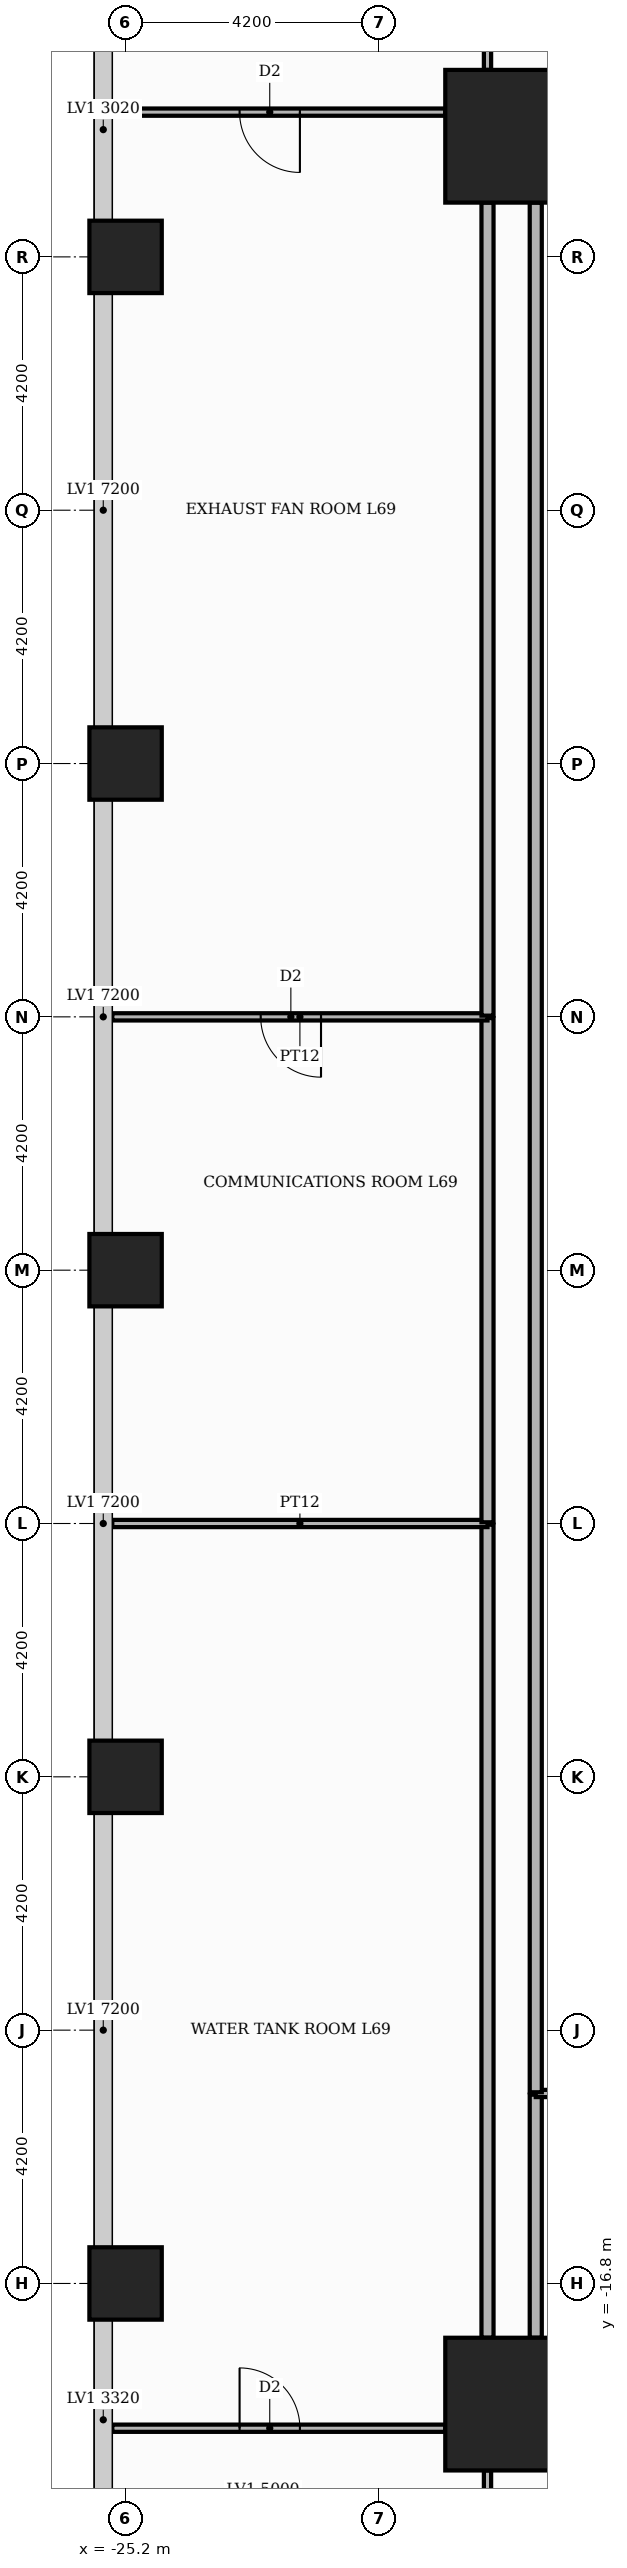
"""IFC4 building model, lengths in metres.
Left out: names, types, materials, properties, quantities, classifications, styles, units other than length and angle.
Written with IfcOpenShell. Run it as: python <this file> out.ifc"""

import sys

from ifc_helpers import new_model, si_unit, direction, frame, frame_2d, origin, origin_2d, place, context, subcontext, project, spatial, rectangle, extrude, element, fill, save


model = new_model("IFC4")
c1 = context("Model", 3, precision=1e-05, world=origin(), true_north=direction((0.0, 1.0)))
c2 = subcontext(c1, "Body", "Model", "MODEL_VIEW")
j1 = project(units=[si_unit("LENGTHUNIT", "METRE"), si_unit("PLANEANGLEUNIT", "RADIAN")], contexts=[c1])
p1 = place(None, origin())
s1 = spatial("IfcSite", under=j1, at=p1, CompositionType="ELEMENT")
p2 = place(p1, origin())
s2 = spatial("IfcBuilding", under=s1, at=p2, CompositionType="ELEMENT")
p3 = place(p2, frame((0.0, 0.0, 287.4)))
s3 = spatial("IfcBuildingStorey", under=s2, at=p3, CompositionType="ELEMENT", Elevation=287.4)
for number, where, z_axis, x_axis in (
    (1, (-18.8, 18.8, 0.0), (0.0, 0.0, 1.0), (1.0, 0.0, 0.0)),
    (2, (-18.8, -18.8, 0.0), (0.0, 0.0, 1.0), (1.0, 0.0, 0.0)),
):
    element("IfcColumn", number, at=place(p3, frame(where, z_axis=z_axis, x_axis=x_axis)), inside=s3, PredefinedType="COLUMN", context=c2, shape_type="SweptSolid", body=[
        extrude(rectangle(XDim=2.2, YDim=2.2, at=origin_2d()), origin(), (0.0, 0.0, 1.0), 5.4),
    ])
for number, where, z_axis, x_axis in (
    (3, (-25.2, 0.0, 0.0), (0.0, 0.0, 1.0), (1.0, 0.0, 0.0)),
    (4, (-25.2, -8.4, 0.0), (0.0, 0.0, 1.0), (1.0, 0.0, 0.0)),
    (5, (-25.2, -16.8, 0.0), (0.0, 0.0, 1.0), (1.0, 0.0, 0.0)),
    (6, (-25.2, 8.4, 0.0), (0.0, 0.0, 1.0), (1.0, 0.0, 0.0)),
    (7, (-25.2, 16.8, 0.0), (0.0, 0.0, 1.0), (1.0, 0.0, 0.0)),
):
    element("IfcColumn", number, at=place(p3, frame(where, z_axis=z_axis, x_axis=x_axis)), inside=s3, PredefinedType="COLUMN", context=c2, shape_type="SweptSolid", body=[
        extrude(rectangle(XDim=1.2, YDim=1.2, at=origin_2d()), origin(), (0.0, 0.0, 1.0), 5.4),
    ])
p4 = place(p3, frame((-19.2, -25.42, 0.0), z_axis=(0.0, 0.0, 1.0), x_axis=(0.0, 1.0, 0.0)))
e8 = element("IfcWall", 8, at=p4, inside=s3, PredefinedType="PARTITIONING", context=c2, shape_type="SweptSolid", body=[
    extrude(rectangle(XDim=5.52, YDim=0.12, at=frame_2d((2.76, 0.0))), origin(), (0.0, 0.0, 1.0), 5.05),
])
p5 = place(p4, frame((2.11, 0.0, 0.0)))
e9 = element("IfcOpeningElement", 9, at=p5, cuts=e8, PredefinedType="OPENING", context=c2, shape_type="SweptSolid", body=[
    extrude(rectangle(XDim=1.0, YDim=2.1, at=frame_2d((0.5, 1.05))), frame((0.0, 0.07, 0.0), z_axis=(0.0, -1.0, 0.0), x_axis=(1.0, 0.0, 0.0)), (0.0, 0.0, 1.0), 0.14),
])
p6 = place(p3, frame((-25.42, -19.2, 0.0), z_axis=(0.0, 0.0, 1.0), x_axis=(1.0, 0.0, 0.0)))
e10 = element("IfcWall", 10, at=p6, inside=s3, PredefinedType="PARTITIONING", context=c2, shape_type="SweptSolid", body=[
    extrude(rectangle(XDim=5.52, YDim=0.12, at=frame_2d((2.76, 0.0))), origin(), (0.0, 0.0, 1.0), 5.05),
])
p7 = place(p6, frame((2.11, 0.0, 0.0)))
e11 = element("IfcOpeningElement", 11, at=p7, cuts=e10, PredefinedType="OPENING", context=c2, shape_type="SweptSolid", body=[
    extrude(rectangle(XDim=1.0, YDim=2.1, at=frame_2d((0.5, 1.05))), frame((0.0, 0.07, 0.0), z_axis=(0.0, -1.0, 0.0), x_axis=(1.0, 0.0, 0.0)), (0.0, 0.0, 1.0), 0.14),
])
p8 = place(p3, frame((-19.2, -17.7, 0.0), z_axis=(0.0, 0.0, 1.0), x_axis=(0.0, 1.0, 0.0)))
e12 = element("IfcWall", 12, at=p8, inside=s3, PredefinedType="PARTITIONING", context=c2, shape_type="SweptSolid", body=[
    extrude(rectangle(XDim=13.48, YDim=0.2, at=frame_2d((6.74, 0.0))), origin(), (0.0, 0.0, 1.0), 5.05),
])
p9 = place(p3, frame((-18.4, -17.7, 0.0), z_axis=(0.0, 0.0, 1.0), x_axis=(0.0, 1.0, 0.0)))
e13 = element("IfcWall", 13, at=p9, inside=s3, PredefinedType="PARTITIONING", context=c2, shape_type="SweptSolid", body=[
    extrude(rectangle(XDim=4.03, YDim=0.2, at=frame_2d((2.015, 0.0))), origin(), (0.0, 0.0, 1.0), 5.05),
])
p10 = place(p3, frame((-18.4, -13.65, 0.0), z_axis=(0.0, 0.0, 1.0), x_axis=(1.0, 0.0, 0.0)))
e14 = element("IfcWall", 14, at=p10, inside=s3, PredefinedType="PARTITIONING", context=c2, shape_type="SweptSolid", body=[
    extrude(rectangle(XDim=4.75, YDim=0.12, at=frame_2d((2.375, 0.0))), origin(), (0.0, 0.0, 1.0), 5.05),
])
p11 = place(p3, frame((-18.4, -13.63, 0.0), z_axis=(0.0, 0.0, 1.0), x_axis=(0.0, 1.0, 0.0)))
e15 = element("IfcWall", 15, at=p11, inside=s3, PredefinedType="PARTITIONING", context=c2, shape_type="SweptSolid", body=[
    extrude(rectangle(XDim=31.33, YDim=0.2, at=frame_2d((15.665, 0.0))), origin(), (0.0, 0.0, 1.0), 5.05),
])
p12 = place(p3, frame((-25.42, -4.2, 0.0), z_axis=(0.0, 0.0, 1.0), x_axis=(1.0, 0.0, 0.0)))
e16 = element("IfcWall", 16, at=p12, inside=s3, PredefinedType="PARTITIONING", context=c2, shape_type="SweptSolid", body=[
    extrude(rectangle(XDim=6.22, YDim=0.12, at=frame_2d((3.11, 0.0))), origin(), (0.0, 0.0, 1.0), 5.05),
])
p13 = place(p3, frame((-19.2, -4.18, 0.0), z_axis=(0.0, 0.0, 1.0), x_axis=(0.0, 1.0, 0.0)))
e17 = element("IfcWall", 17, at=p13, inside=s3, PredefinedType="PARTITIONING", context=c2, shape_type="SweptSolid", body=[
    extrude(rectangle(XDim=8.36, YDim=0.2, at=frame_2d((4.18, 0.0))), origin(), (0.0, 0.0, 1.0), 5.05),
])
p14 = place(p3, frame((-25.42, 4.2, 0.0), z_axis=(0.0, 0.0, 1.0), x_axis=(1.0, 0.0, 0.0)))
e18 = element("IfcWall", 18, at=p14, inside=s3, PredefinedType="PARTITIONING", context=c2, shape_type="SweptSolid", body=[
    extrude(rectangle(XDim=6.22, YDim=0.12, at=frame_2d((3.11, 0.0))), origin(), (0.0, 0.0, 1.0), 5.05),
])
p15 = place(p14, frame((2.46, 0.0, 0.0)))
e19 = element("IfcOpeningElement", 19, at=p15, cuts=e18, PredefinedType="OPENING", context=c2, shape_type="SweptSolid", body=[
    extrude(rectangle(XDim=1.0, YDim=2.1, at=frame_2d((0.5, 1.05))), frame((0.0, 0.07, 0.0), z_axis=(0.0, -1.0, 0.0), x_axis=(1.0, 0.0, 0.0)), (0.0, 0.0, 1.0), 0.14),
])
p16 = place(p3, frame((-19.2, 4.22, 0.0), z_axis=(0.0, 0.0, 1.0), x_axis=(0.0, 1.0, 0.0)))
e20 = element("IfcWall", 20, at=p16, inside=s3, PredefinedType="PARTITIONING", context=c2, shape_type="SweptSolid", body=[
    extrude(rectangle(XDim=13.48, YDim=0.2, at=frame_2d((6.74, 0.0))), origin(), (0.0, 0.0, 1.0), 5.05),
])
p17 = place(p3, frame((-25.42, 19.2, 0.0), z_axis=(0.0, 0.0, 1.0), x_axis=(1.0, 0.0, 0.0)))
e21 = element("IfcWall", 21, at=p17, inside=s3, PredefinedType="PARTITIONING", context=c2, shape_type="SweptSolid", body=[
    extrude(rectangle(XDim=5.52, YDim=0.12, at=frame_2d((2.76, 0.0))), origin(), (0.0, 0.0, 1.0), 5.05),
])
p18 = place(p17, frame((2.11, 0.0, 0.0)))
e22 = element("IfcOpeningElement", 22, at=p18, cuts=e21, PredefinedType="OPENING", context=c2, shape_type="SweptSolid", body=[
    extrude(rectangle(XDim=1.0, YDim=2.1, at=frame_2d((0.5, 1.05))), frame((0.0, 0.07, 0.0), z_axis=(0.0, -1.0, 0.0), x_axis=(1.0, 0.0, 0.0)), (0.0, 0.0, 1.0), 0.14),
])
p19 = place(p3, frame((-19.2, 19.9, 0.0), z_axis=(0.0, 0.0, 1.0), x_axis=(0.0, 1.0, 0.0)))
e23 = element("IfcWall", 23, at=p19, inside=s3, PredefinedType="PARTITIONING", context=c2, shape_type="SweptSolid", body=[
    extrude(rectangle(XDim=5.52, YDim=0.12, at=frame_2d((2.76, 0.0))), origin(), (0.0, 0.0, 1.0), 5.05),
])
p20 = place(p19, frame((2.41, 0.0, 0.0)))
e24 = element("IfcOpeningElement", 24, at=p20, cuts=e23, PredefinedType="OPENING", context=c2, shape_type="SweptSolid", body=[
    extrude(rectangle(XDim=1.0, YDim=2.1, at=frame_2d((0.5, 1.05))), frame((0.0, 0.07, 0.0), z_axis=(0.0, -1.0, 0.0), x_axis=(1.0, 0.0, 0.0)), (0.0, 0.0, 1.0), 0.14),
])
p21 = place(p18, frame((1.0, 0.0, 0.0), z_axis=(0.0, 0.0, 1.0), x_axis=(-1.0, 0.0, 0.0)))
e25 = element("IfcDoor", 25, at=p21, inside=s3, OperationType="SINGLE_SWING_RIGHT", PredefinedType="DOOR", context=c2, shape_type="SweptSolid", body=[
    extrude(rectangle(XDim=1.0, YDim=2.1, at=frame_2d((0.5, 1.05))), frame((0.0, 0.025, 0.0), z_axis=(0.0, -1.0, 0.0), x_axis=(1.0, 0.0, 0.0)), (0.0, 0.0, 1.0), 0.05),
])
fill(e22, e25)
p22 = place(p15, frame((1.0, 0.0, 0.0), z_axis=(0.0, 0.0, 1.0), x_axis=(-1.0, 0.0, 0.0)))
e26 = element("IfcDoor", 26, at=p22, inside=s3, OperationType="SINGLE_SWING_RIGHT", PredefinedType="DOOR", context=c2, shape_type="SweptSolid", body=[
    extrude(rectangle(XDim=1.0, YDim=2.1, at=frame_2d((0.5, 1.05))), frame((0.0, 0.025, 0.0), z_axis=(0.0, -1.0, 0.0), x_axis=(1.0, 0.0, 0.0)), (0.0, 0.0, 1.0), 0.05),
])
fill(e19, e26)
p23 = place(p7, origin())
e27 = element("IfcDoor", 27, at=p23, inside=s3, OperationType="SINGLE_SWING_LEFT", PredefinedType="DOOR", context=c2, shape_type="SweptSolid", body=[
    extrude(rectangle(XDim=1.0, YDim=2.1, at=frame_2d((0.5, 1.05))), frame((0.0, 0.025, 0.0), z_axis=(0.0, -1.0, 0.0), x_axis=(1.0, 0.0, 0.0)), (0.0, 0.0, 1.0), 0.05),
])
fill(e11, e27)
save(model, sys.argv[1])
